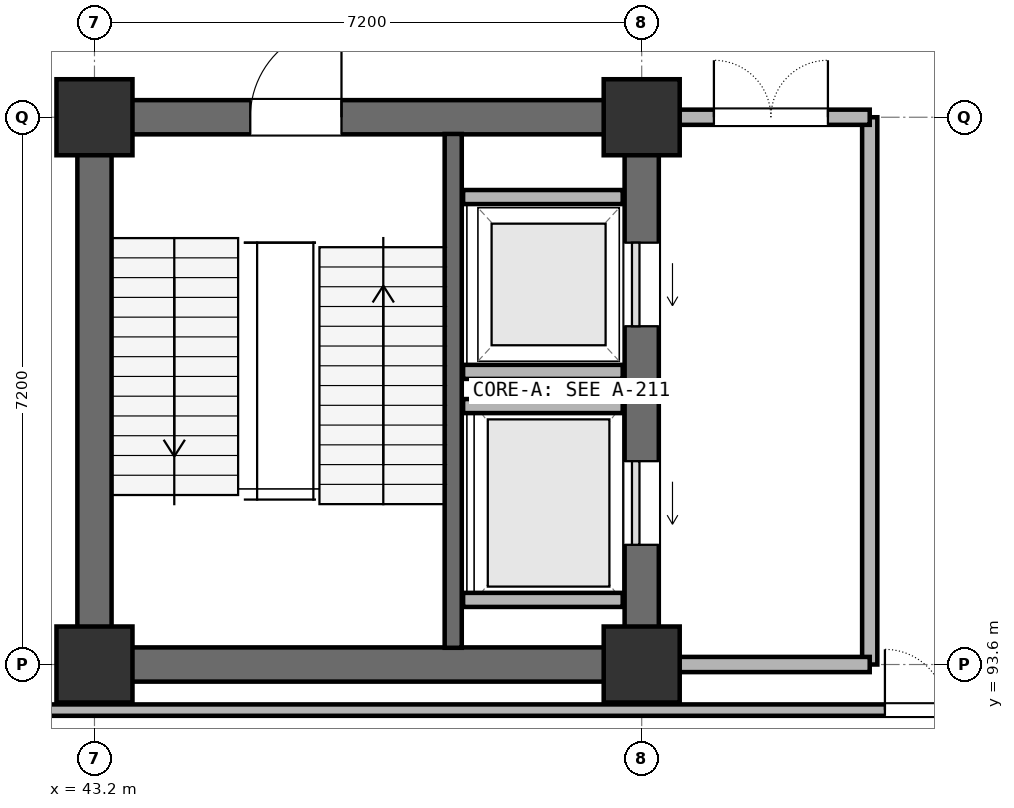
"""IFC4 building model, lengths in metres.
Left out: names, types, materials, properties, quantities, classifications, styles, units other than length and angle.
Written with IfcOpenShell. Run it as: python <this file> out.ifc"""

import sys

from ifc_helpers import new_model, si_unit, direction, frame, frame_2d, origin, origin_2d, place, context, subcontext, project, spatial, rectangle, extrude, element, fill, save


model = new_model("IFC4")
c1 = context("Model", 3, precision=1e-05, world=origin(), true_north=direction((0.0, 1.0)))
c2 = subcontext(c1, "Body", "Model", "MODEL_VIEW")
j1 = project(units=[si_unit("LENGTHUNIT", "METRE"), si_unit("PLANEANGLEUNIT", "RADIAN")], contexts=[c1])
p1 = place(None, origin())
s1 = spatial("IfcSite", under=j1, at=p1, CompositionType="ELEMENT")
p2 = place(p1, origin())
s2 = spatial("IfcBuilding", under=s1, at=p2, CompositionType="ELEMENT")
p3 = place(p2, frame((0.0, 0.0, -4.8)))
s3 = spatial("IfcBuildingStorey", under=s2, at=p3, CompositionType="ELEMENT", Elevation=-4.8)
for number, where, z_axis, x_axis in (
    (1, (43.2, 93.6, 0.0), (0.0, 0.0, 1.0), (1.0, 0.0, 0.0)),
    (2, (43.2, 100.8, 0.0), (0.0, 0.0, 1.0), (1.0, 0.0, 0.0)),
    (3, (50.4, 93.6, 0.0), (0.0, 0.0, 1.0), (1.0, 0.0, 0.0)),
    (4, (50.4, 100.8, 0.0), (0.0, 0.0, 1.0), (1.0, 0.0, 0.0)),
):
    element("IfcColumn", number, at=place(p3, frame(where, z_axis=z_axis, x_axis=x_axis)), inside=s3, PredefinedType="COLUMN", context=c2, shape_type="SweptSolid", body=[
        extrude(rectangle(XDim=1.0, YDim=1.0, at=origin_2d()), origin(), (0.0, 0.0, 1.0), 4.8),
    ])
p4 = place(p3, frame((43.55, 93.6, 0.0), z_axis=(0.0, 0.0, 1.0), x_axis=(1.0, 0.0, 0.0)))
e5 = element("IfcWall", 5, at=p4, inside=s3, PredefinedType="SHEAR", context=c2, shape_type="SweptSolid", body=[
    extrude(rectangle(XDim=6.5, YDim=0.45, at=frame_2d((3.25, 0.0))), origin(), (0.0, 0.0, 1.0), 4.8),
])
p5 = place(p3, frame((50.4, 93.95, 0.0), z_axis=(0.0, 0.0, 1.0), x_axis=(0.0, 1.0, 0.0)))
e6 = element("IfcWall", 6, at=p5, inside=s3, PredefinedType="SHEAR", context=c2, shape_type="SweptSolid", body=[
    extrude(rectangle(XDim=6.5, YDim=0.45, at=frame_2d((3.25, 0.0))), origin(), (0.0, 0.0, 1.0), 4.8),
])
p6 = place(p5, frame((1.225, 0.0, 0.0)))
e7 = element("IfcOpeningElement", 7, at=p6, cuts=e6, PredefinedType="OPENING", context=c2, shape_type="SweptSolid", body=[
    extrude(rectangle(XDim=1.1, YDim=2.2, at=frame_2d((0.55, 1.1))), frame((0.0, 0.235, 0.0), z_axis=(0.0, -1.0, 0.0), x_axis=(1.0, 0.0, 0.0)), (0.0, 0.0, 1.0), 0.47),
])
p7 = place(p5, frame((4.1, 0.0, 0.0)))
e8 = element("IfcOpeningElement", 8, at=p7, cuts=e6, PredefinedType="OPENING", context=c2, shape_type="SweptSolid", body=[
    extrude(rectangle(XDim=1.1, YDim=2.2, at=frame_2d((0.55, 1.1))), frame((0.0, 0.235, 0.0), z_axis=(0.0, -1.0, 0.0), x_axis=(1.0, 0.0, 0.0)), (0.0, 0.0, 1.0), 0.47),
])
p8 = place(p3, frame((50.05, 100.8, 0.0), z_axis=(0.0, 0.0, 1.0), x_axis=(-1.0, 0.0, 0.0)))
e9 = element("IfcWall", 9, at=p8, inside=s3, PredefinedType="SHEAR", context=c2, shape_type="SweptSolid", body=[
    extrude(rectangle(XDim=6.5, YDim=0.45, at=frame_2d((3.25, 0.0))), origin(), (0.0, 0.0, 1.0), 4.8),
])
p9 = place(p8, frame((3.6, 0.0, 0.0)))
e10 = element("IfcOpeningElement", 10, at=p9, cuts=e9, PredefinedType="OPENING", context=c2, shape_type="SweptSolid", body=[
    extrude(rectangle(XDim=1.2, YDim=2.2, at=frame_2d((0.6, 1.1))), frame((0.0, 0.235, 0.0), z_axis=(0.0, -1.0, 0.0), x_axis=(1.0, 0.0, 0.0)), (0.0, 0.0, 1.0), 0.47),
])
p10 = place(p3, frame((43.2, 100.45, 0.0), z_axis=(0.0, 0.0, 1.0), x_axis=(0.0, -1.0, 0.0)))
e11 = element("IfcWall", 11, at=p10, inside=s3, PredefinedType="SHEAR", context=c2, shape_type="SweptSolid", body=[
    extrude(rectangle(XDim=6.5, YDim=0.45, at=frame_2d((3.25, 0.0))), origin(), (0.0, 0.0, 1.0), 4.8),
])
p11 = place(p3, frame((47.92, 93.82, 0.0), z_axis=(0.0, 0.0, 1.0), x_axis=(0.0, 1.0, 0.0)))
e12 = element("IfcWall", 12, at=p11, inside=s3, PredefinedType="SHEAR", context=c2, shape_type="SweptSolid", body=[
    extrude(rectangle(XDim=6.76, YDim=0.225, at=frame_2d((3.38, 0.0))), origin(), (0.0, 0.0, 1.0), 4.8),
])
for number, where, z_axis, x_axis in (
    (13, (48.05, 94.45, 0.0), (0.0, 0.0, 1.0), (1.0, 0.0, 0.0)),
    (14, (48.05, 97.0, 0.0), (0.0, 0.0, 1.0), (1.0, 0.0, 0.0)),
    (15, (48.05, 97.45, 0.0), (0.0, 0.0, 1.0), (1.0, 0.0, 0.0)),
    (16, (48.05, 99.75, 0.0), (0.0, 0.0, 1.0), (1.0, 0.0, 0.0)),
):
    element("IfcWall", number, at=place(p3, frame(where, z_axis=z_axis, x_axis=x_axis)), inside=s3, PredefinedType="PARTITIONING", context=c2, shape_type="SweptSolid", body=[
        extrude(rectangle(XDim=2.1, YDim=0.185, at=frame_2d((1.05, 0.0))), origin(), (0.0, 0.0, 1.0), 4.8),
    ])
p12 = place(p3, frame((53.4, 93.6, 0.0), z_axis=(0.0, 0.0, 1.0), x_axis=(0.0, 1.0, 0.0)))
e17 = element("IfcWall", 17, at=p12, inside=s3, PredefinedType="PARTITIONING", context=c2, shape_type="SweptSolid", body=[
    extrude(rectangle(XDim=7.2, YDim=0.2, at=frame_2d((3.6, 0.0))), origin(), (0.0, 0.0, 1.0), 3.52),
])
p13 = place(p3, frame((50.88, 93.6, 0.0), z_axis=(0.0, 0.0, 1.0), x_axis=(1.0, 0.0, 0.0)))
e18 = element("IfcWall", 18, at=p13, inside=s3, PredefinedType="PARTITIONING", context=c2, shape_type="SweptSolid", body=[
    extrude(rectangle(XDim=2.52, YDim=0.2, at=frame_2d((1.26, 0.0))), origin(), (0.0, 0.0, 1.0), 3.52),
])
p14 = place(p3, frame((53.4, 100.8, 0.0), z_axis=(0.0, 0.0, 1.0), x_axis=(-1.0, 0.0, 0.0)))
e19 = element("IfcWall", 19, at=p14, inside=s3, PredefinedType="PARTITIONING", context=c2, shape_type="SweptSolid", body=[
    extrude(rectangle(XDim=2.52, YDim=0.2, at=frame_2d((1.26, 0.0))), origin(), (0.0, 0.0, 1.0), 3.52),
])
p15 = place(p14, frame((0.55, 0.0, 0.0)))
e20 = element("IfcOpeningElement", 20, at=p15, cuts=e19, PredefinedType="OPENING", context=c2, shape_type="SweptSolid", body=[
    extrude(rectangle(XDim=1.5, YDim=2.2, at=frame_2d((0.75, 1.1))), frame((0.0, 0.11, 0.0), z_axis=(0.0, -1.0, 0.0), x_axis=(1.0, 0.0, 0.0)), (0.0, 0.0, 1.0), 0.22),
])
p16 = place(p3, frame((37.2, 93.0, 0.0), z_axis=(0.0, 0.0, 1.0), x_axis=(1.0, 0.0, 0.0)))
e21 = element("IfcWall", 21, at=p16, inside=s3, PredefinedType="PARTITIONING", context=c2, shape_type="SweptSolid", body=[
    extrude(rectangle(XDim=48.6, YDim=0.15, at=frame_2d((24.3, 0.0))), origin(), (0.0, 0.0, 1.0), 3.52),
])
p17 = place(p16, frame((16.4, 0.0, 0.0)))
e22 = element("IfcOpeningElement", 22, at=p17, cuts=e21, PredefinedType="OPENING", context=c2, shape_type="SweptSolid", body=[
    extrude(rectangle(XDim=1.6, YDim=2.2, at=frame_2d((0.8, 1.1))), frame((0.0, 0.085, 0.0), z_axis=(0.0, -1.0, 0.0), x_axis=(1.0, 0.0, 0.0)), (0.0, 0.0, 1.0), 0.17),
])
p18 = place(p6, origin())
e23 = element("IfcDoor", 23, at=p18, inside=s3, OperationType="SLIDING_TO_LEFT", PredefinedType="DOOR", context=c2, shape_type="SweptSolid", body=[
    extrude(rectangle(XDim=1.1, YDim=2.2, at=frame_2d((0.55, 1.1))), frame((0.0, 0.025, 0.0), z_axis=(0.0, -1.0, 0.0), x_axis=(1.0, 0.0, 0.0)), (0.0, 0.0, 1.0), 0.05),
])
fill(e7, e23)
p19 = place(p7, origin())
e24 = element("IfcDoor", 24, at=p19, inside=s3, OperationType="SLIDING_TO_LEFT", PredefinedType="DOOR", context=c2, shape_type="SweptSolid", body=[
    extrude(rectangle(XDim=1.1, YDim=2.2, at=frame_2d((0.55, 1.1))), frame((0.0, 0.025, 0.0), z_axis=(0.0, -1.0, 0.0), x_axis=(1.0, 0.0, 0.0)), (0.0, 0.0, 1.0), 0.05),
])
fill(e8, e24)
p20 = place(p9, frame((1.2, 0.0, 0.0), z_axis=(0.0, 0.0, 1.0), x_axis=(-1.0, 0.0, 0.0)))
e25 = element("IfcDoor", 25, at=p20, inside=s3, OperationType="SINGLE_SWING_RIGHT", PredefinedType="DOOR", context=c2, shape_type="SweptSolid", body=[
    extrude(rectangle(XDim=1.2, YDim=2.2, at=frame_2d((0.6, 1.1))), frame((0.0, 0.025, 0.0), z_axis=(0.0, -1.0, 0.0), x_axis=(1.0, 0.0, 0.0)), (0.0, 0.0, 1.0), 0.05),
])
fill(e10, e25)
p21 = place(p15, frame((1.5, 0.0, 0.0), z_axis=(0.0, 0.0, 1.0), x_axis=(-1.0, 0.0, 0.0)))
e26 = element("IfcDoor", 26, at=p21, inside=s3, OperationType="DOUBLE_DOOR_SINGLE_SWING", PredefinedType="DOOR", context=c2, shape_type="SweptSolid", body=[
    extrude(rectangle(XDim=1.5, YDim=2.2, at=frame_2d((0.75, 1.1))), frame((0.0, 0.025, 0.0), z_axis=(0.0, -1.0, 0.0), x_axis=(1.0, 0.0, 0.0)), (0.0, 0.0, 1.0), 0.05),
])
fill(e20, e26)
p22 = place(p17, origin())
e27 = element("IfcDoor", 27, at=p22, inside=s3, OperationType="DOUBLE_DOOR_SINGLE_SWING", PredefinedType="DOOR", context=c2, shape_type="SweptSolid", body=[
    extrude(rectangle(XDim=1.6, YDim=2.2, at=frame_2d((0.8, 1.1))), frame((0.0, 0.025, 0.0), z_axis=(0.0, -1.0, 0.0), x_axis=(1.0, 0.0, 0.0)), (0.0, 0.0, 1.0), 0.05),
])
fill(e22, e27)
save(model, sys.argv[1])
